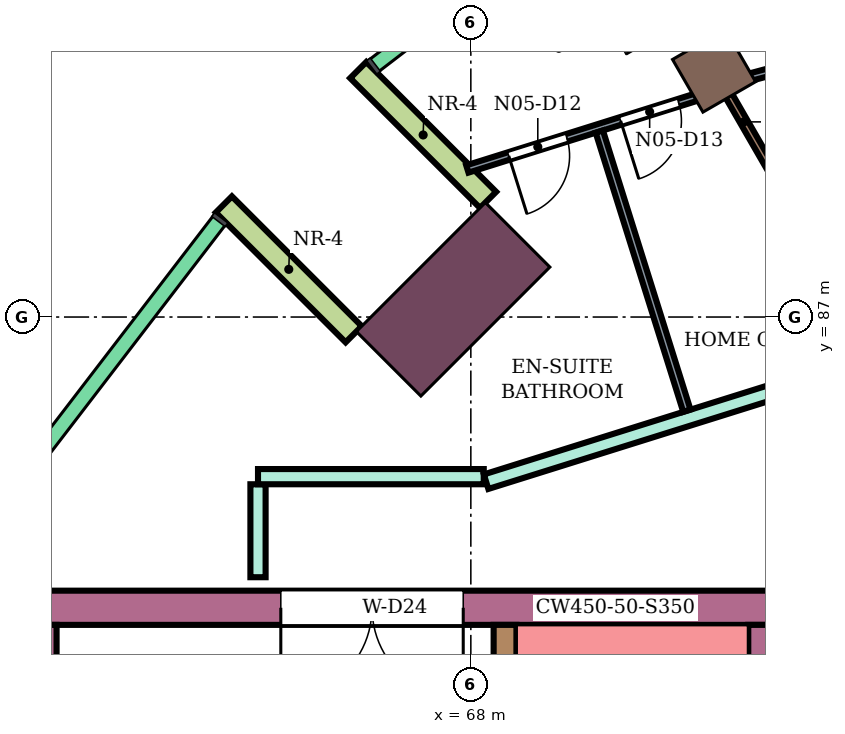
"""IFC4 building model, lengths in metres.
Left out: names, types, materials, properties, quantities, classifications, styles, units other than length and angle.
Written with IfcOpenShell. Run it as: python <this file> out.ifc"""

import sys

from ifc_helpers import new_model, si_unit, direction, frame, frame_2d, origin, origin_2d, place, context, subcontext, project, spatial, rectangle, extrude, element, fill, save


model = new_model("IFC4")
c1 = context("Model", 3, precision=1e-05, world=origin(), true_north=direction((0.0, 1.0)))
c2 = subcontext(c1, "Body", "Model", "MODEL_VIEW")
j1 = project(units=[si_unit("LENGTHUNIT", "METRE"), si_unit("PLANEANGLEUNIT", "RADIAN")], contexts=[c1])
p1 = place(None, origin())
s1 = spatial("IfcSite", under=j1, at=p1, CompositionType="ELEMENT")
p2 = place(p1, origin())
s2 = spatial("IfcBuilding", under=s1, at=p2, CompositionType="ELEMENT")
p3 = place(p2, frame((0.0, 0.0, 323.7)))
s3 = spatial("IfcBuildingStorey", under=s2, at=p3, CompositionType="ELEMENT", Elevation=323.7)
p4 = place(p3, frame((71.2, 90.242, 0.0), z_axis=(0.0, 0.0, 1.0), x_axis=(-0.5, 0.866025403784, 0.0)))
e1 = element("IfcColumn", 1, at=p4, inside=s3, PredefinedType="COLUMN", context=c2, shape_type="SweptSolid", body=[
    extrude(rectangle(XDim=0.8, YDim=0.8, at=origin_2d()), origin(), (0.0, 0.0, 1.0), 4.4),
])
p5 = place(p3, frame((67.767, 87.233, 0.0), z_axis=(0.0, 0.0, 1.0), x_axis=(-0.707106781187, 0.707106781187, 0.0)))
e2 = element("IfcColumn", 2, at=p5, inside=s3, PredefinedType="COLUMN", context=c2, shape_type="SweptSolid", body=[
    extrude(rectangle(XDim=1.2, YDim=2.4, at=origin_2d()), origin(), (0.0, 0.0, 1.0), 4.4),
])
p6 = place(p3, frame((72.1, 83.175, 0.0), z_axis=(0.0, 0.0, 1.0), x_axis=(-1.0, 0.0, 0.0)))
e3 = element("IfcWall", 3, at=p6, inside=s3, PredefinedType="SHEAR", context=c2, shape_type="SweptSolid", body=[
    extrude(rectangle(XDim=10.0, YDim=0.45, at=frame_2d((5.0, 0.0))), origin(), (0.0, 0.0, 1.0), 4.05),
])
p7 = place(p6, frame((4.2, 0.0, 0.0)))
e4 = element("IfcOpeningElement", 4, at=p7, cuts=e3, PredefinedType="OPENING", context=c2, shape_type="SweptSolid", body=[
    extrude(rectangle(XDim=2.4, YDim=2.4, at=frame_2d((1.2, 1.2))), frame((0.0, 0.235, 0.0), z_axis=(0.0, -1.0, 0.0), x_axis=(1.0, 0.0, 0.0)), (0.0, 0.0, 1.0), 0.47),
])
p8 = place(p3, frame((71.875, 82.95, 0.0), z_axis=(0.0, 0.0, 1.0), x_axis=(0.0, -1.0, 0.0)))
e5 = element("IfcWall", 5, at=p8, inside=s3, PredefinedType="SHEAR", context=c2, shape_type="SweptSolid", body=[
    extrude(rectangle(XDim=7.95, YDim=0.45, at=frame_2d((3.975, 0.0))), origin(), (0.0, 0.0, 1.0), 4.05),
])
p9 = place(p3, frame((62.325, 82.95, 0.0), z_axis=(0.0, 0.0, 1.0), x_axis=(0.0, -1.0, 0.0)))
e6 = element("IfcWall", 6, at=p9, inside=s3, PredefinedType="SHEAR", context=c2, shape_type="SweptSolid", body=[
    extrude(rectangle(XDim=3.7, YDim=0.45, at=frame_2d((1.85, 0.0))), origin(), (0.0, 0.0, 1.0), 4.05),
])
p10 = place(p3, frame((68.45, 82.95, 0.0), z_axis=(0.0, 0.0, 1.0), x_axis=(0.0, -1.0, 0.0)))
e7 = element("IfcWall", 7, at=p10, inside=s3, PredefinedType="SHEAR", context=c2, shape_type="SweptSolid", body=[
    extrude(rectangle(XDim=7.95, YDim=0.3, at=frame_2d((3.975, 0.0))), origin(), (0.0, 0.0, 1.0), 4.05),
])
p11 = place(p10, frame((0.6, 0.0, 0.0)))
e8 = element("IfcOpeningElement", 8, at=p11, cuts=e7, PredefinedType="OPENING", context=c2, shape_type="SweptSolid", body=[
    extrude(rectangle(XDim=0.9, YDim=2.1, at=frame_2d((0.45, 1.05))), frame((0.0, 0.16, 0.0), z_axis=(0.0, -1.0, 0.0), x_axis=(1.0, 0.0, 0.0)), (0.0, 0.0, 1.0), 0.32),
])
for number, where, z_axis, x_axis in (
    (9, (68.227, 88.541, 0.0), (0.0, 0.0, 1.0), (-0.707, 0.707, 0.0)),
    (10, (66.459, 86.773, 0.0), (0.0, 0.0, 1.0), (-0.707, 0.707, 0.0)),
):
    element("IfcWall", number, at=place(p3, frame(where, z_axis=z_axis, x_axis=x_axis)), inside=s3, PredefinedType="NOTDEFINED", context=c2, shape_type="SweptSolid", body=[
        extrude(rectangle(XDim=2.416, YDim=0.3, at=frame_2d((1.208, 0.0))), origin(), (0.0, 0.0, 1.0), 4.4),
    ])
p12 = place(p3, frame((65.2, 83.577, 0.0), z_axis=(0.0, 0.0, 1.0), x_axis=(0.0, 1.0, 0.0)))
e11 = element("IfcWall", 11, at=p12, inside=s3, PredefinedType="PARTITIONING", context=c2, shape_type="SweptSolid", body=[
    extrude(rectangle(XDim=1.223, YDim=0.2, at=frame_2d((0.612, 0.0))), origin(), (0.0, 0.0, 1.0), 3.95),
])
p13 = place(p3, frame((65.2, 84.9, 0.0), z_axis=(0.0, 0.0, 1.0), x_axis=(1.0, 0.0, 0.0)))
e12 = element("IfcWall", 12, at=p13, inside=s3, PredefinedType="PARTITIONING", context=c2, shape_type="SweptSolid", body=[
    extrude(rectangle(XDim=2.97, YDim=0.2, at=frame_2d((1.485, 0.0))), origin(), (0.0, 0.0, 1.0), 3.95),
])
p14 = place(p3, frame((68.201, 84.834, 0.0), z_axis=(0.0, 0.0, 1.0), x_axis=(0.954232917497, 0.29906443982, 0.0)))
e13 = element("IfcWall", 13, at=p14, inside=s3, PredefinedType="PARTITIONING", context=c2, shape_type="SweptSolid", body=[
    extrude(rectangle(XDim=5.74, YDim=0.2, at=frame_2d((2.87, 0.0))), origin(), (0.0, 0.0, 1.0), 3.95),
])
p15 = place(p3, frame((67.954, 88.948, 0.0), z_axis=(0.0, 0.0, 1.0), x_axis=(0.954122535632, 0.299416410704, 0.0)))
e14 = element("IfcWall", 14, at=p15, inside=s3, PredefinedType="PARTITIONING", context=c2, shape_type="SweptSolid", body=[
    extrude(rectangle(XDim=3.482, YDim=0.1, at=frame_2d((1.741, 0.0))), origin(), (0.0, 0.0, 1.0), 3.95),
])
p16 = place(p15, frame((0.571, 0.0, 0.0)))
e15 = element("IfcOpeningElement", 15, at=p16, cuts=e14, PredefinedType="OPENING", context=c2, shape_type="SweptSolid", body=[
    extrude(rectangle(XDim=0.8, YDim=2.1, at=frame_2d((0.4, 1.05))), frame((0.0, 0.06, 0.0), z_axis=(0.0, -1.0, 0.0), x_axis=(1.0, 0.0, 0.0)), (0.0, 0.0, 1.0), 0.12),
])
p17 = place(p15, frame((2.114, 0.0, 0.0)))
e16 = element("IfcOpeningElement", 16, at=p17, cuts=e14, PredefinedType="OPENING", context=c2, shape_type="SweptSolid", body=[
    extrude(rectangle(XDim=0.8, YDim=2.1, at=frame_2d((0.4, 1.05))), frame((0.0, 0.06, 0.0), z_axis=(0.0, -1.0, 0.0), x_axis=(1.0, 0.0, 0.0)), (0.0, 0.0, 1.0), 0.12),
])
p18 = place(p3, frame((69.69, 89.44, 0.0), z_axis=(0.0, 0.0, 1.0), x_axis=(0.299260814267, -0.954171349939, 0.0)))
e17 = element("IfcWall", 17, at=p18, inside=s3, PredefinedType="PARTITIONING", context=c2, shape_type="SweptSolid", body=[
    extrude(rectangle(XDim=3.849, YDim=0.1, at=frame_2d((1.925, 0.0))), origin(), (0.0, 0.0, 1.0), 3.95),
])
p19 = place(p3, frame((69.855, 92.579, 0.0), z_axis=(0.0, 0.0, 1.0), x_axis=(0.499801463163, -0.866139998742, 0.0)))
e18 = element("IfcWall", 18, at=p19, inside=s3, PredefinedType="PARTITIONING", context=c2, shape_type="SweptSolid", body=[
    extrude(rectangle(XDim=6.955, YDim=0.1, at=frame_2d((3.478, 0.0))), origin(), (0.0, 0.0, 1.0), 2.45),
])
p20 = place(p19, frame((1.029, 0.0, 0.0)))
e19 = element("IfcOpeningElement", 19, at=p20, cuts=e18, PredefinedType="OPENING", context=c2, shape_type="SweptSolid", body=[
    extrude(rectangle(XDim=0.9, YDim=2.1, at=frame_2d((0.45, 1.05))), frame((0.0, 0.06, 0.0), z_axis=(0.0, -1.0, 0.0), x_axis=(1.0, 0.0, 0.0)), (0.0, 0.0, 1.0), 0.12),
])
p21 = place(p3, frame((71.375, 90.075, 0.0), z_axis=(0.0, 0.0, 1.0), x_axis=(0.965918685896, 0.258845691944, 0.0)))
e20 = element("IfcWall", 20, at=p21, inside=s3, PredefinedType="PARTITIONING", context=c2, shape_type="SweptSolid", body=[
    extrude(rectangle(XDim=4.379, YDim=0.1, at=frame_2d((2.189, 0.0))), origin(), (0.0, 0.0, 1.0), 3.95),
])
p22 = place(p16, frame((0.8, 0.0, 0.0), z_axis=(0.0, 0.0, 1.0), x_axis=(-1.0, 0.0, 0.0)))
e21 = element("IfcDoor", 21, at=p22, inside=s3, OperationType="SINGLE_SWING_RIGHT", PredefinedType="DOOR", context=c2, shape_type="SweptSolid", body=[
    extrude(rectangle(XDim=0.8, YDim=2.1, at=frame_2d((0.4, 1.05))), frame((0.0, 0.025, 0.0), z_axis=(0.0, -1.0, 0.0), x_axis=(1.0, 0.0, 0.0)), (0.0, 0.0, 1.0), 0.05),
])
fill(e15, e21)
p23 = place(p17, frame((0.8, 0.0, 0.0), z_axis=(0.0, 0.0, 1.0), x_axis=(-1.0, 0.0, 0.0)))
e22 = element("IfcDoor", 22, at=p23, inside=s3, OperationType="SINGLE_SWING_RIGHT", PredefinedType="DOOR", context=c2, shape_type="SweptSolid", body=[
    extrude(rectangle(XDim=0.8, YDim=2.1, at=frame_2d((0.4, 1.05))), frame((0.0, 0.025, 0.0), z_axis=(0.0, -1.0, 0.0), x_axis=(1.0, 0.0, 0.0)), (0.0, 0.0, 1.0), 0.05),
])
fill(e16, e22)
p24 = place(p7, origin())
e23 = element("IfcDoor", 23, at=p24, inside=s3, OperationType="DOUBLE_DOOR_SINGLE_SWING", PredefinedType="DOOR", context=c2, shape_type="SweptSolid", body=[
    extrude(rectangle(XDim=2.4, YDim=2.4, at=frame_2d((1.2, 1.2))), frame((0.0, 0.025, 0.0), z_axis=(0.0, -1.0, 0.0), x_axis=(1.0, 0.0, 0.0)), (0.0, 0.0, 1.0), 0.05),
])
fill(e4, e23)
save(model, sys.argv[1])
